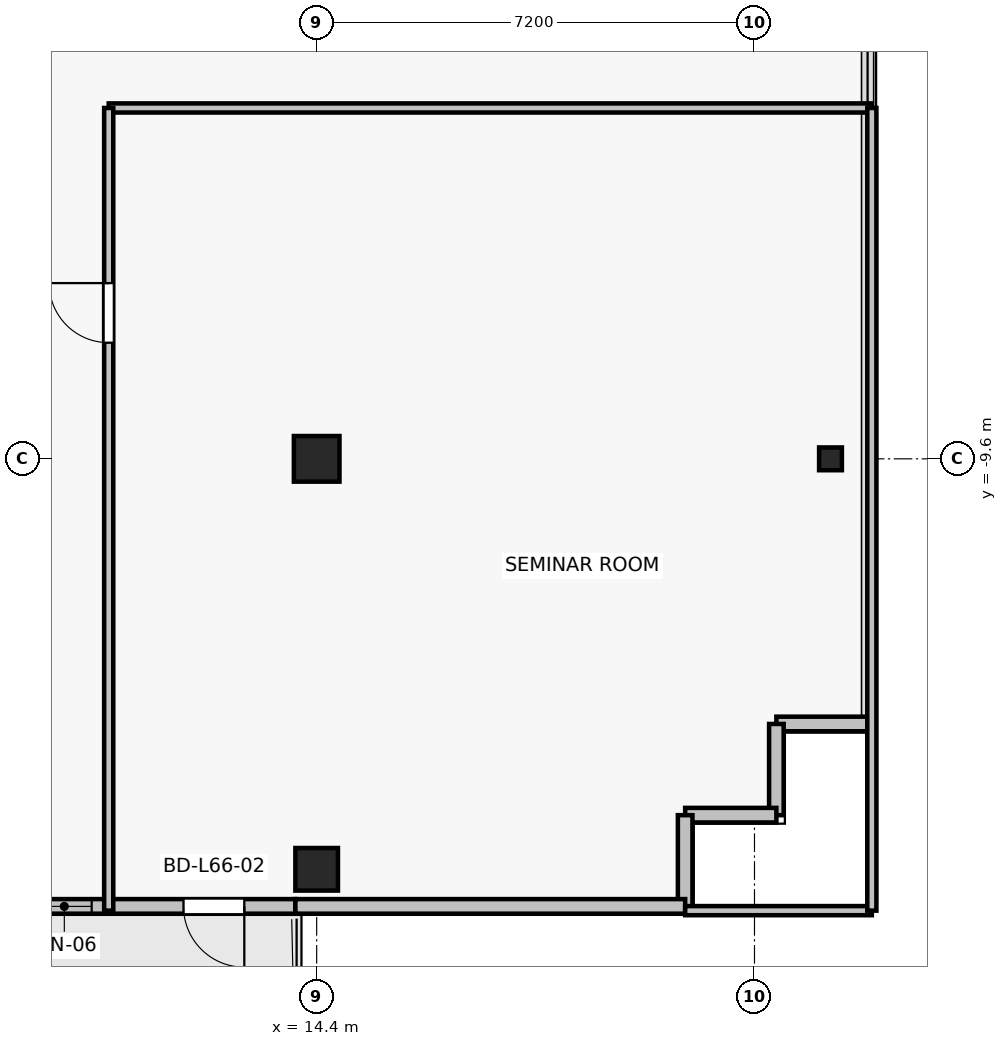
"""IFC4 building model, lengths in metres.
Left out: names, types, materials, properties, quantities, classifications, styles, units other than length and angle.
Written with IfcOpenShell. Run it as: python <this file> out.ifc"""

import sys

from ifc_helpers import new_model, si_unit, direction, frame, frame_2d, origin, origin_2d, place, context, subcontext, project, spatial, rectangle, i_section, extrude, source, transform, mapped, element, fill, save


model = new_model("IFC4")
c1 = context("Model", 3, precision=1e-05, world=origin(), true_north=direction((0.0, 1.0)))
c2 = subcontext(c1, "Body", "Model", "MODEL_VIEW")
j1 = project(units=[si_unit("LENGTHUNIT", "METRE"), si_unit("PLANEANGLEUNIT", "RADIAN")], contexts=[c1])
p1 = place(None, origin())
s1 = spatial("IfcSite", under=j1, at=p1, CompositionType="ELEMENT")
p2 = place(p1, origin())
s2 = spatial("IfcBuilding", under=s1, at=p2, CompositionType="ELEMENT")
p3 = place(p2, frame((0.0, 0.0, 235.3)))
s3 = spatial("IfcBuildingStorey", under=s2, at=p3, CompositionType="ELEMENT", Elevation=235.3)
p4 = place(p3, frame((14.4, -9.6, 0.0), z_axis=(0.0, 0.0, 1.0), x_axis=(1.0, 0.0, 0.0)))
e1 = element("IfcColumn", 1, at=p4, inside=s3, PredefinedType="COLUMN", context=c2, shape_type="SweptSolid", body=[
    extrude(rectangle(XDim=0.75, YDim=0.75, at=origin_2d()), origin(), (0.0, 0.0, 1.0), 3.3),
])
p5 = place(p3, frame((14.4, -16.35, 0.0), z_axis=(0.0, 0.0, 1.0), x_axis=(1.0, 0.0, 0.0)))
e2 = element("IfcColumn", 2, at=p5, inside=s3, PredefinedType="COLUMN", context=c2, shape_type="SweptSolid", body=[
    extrude(rectangle(XDim=0.7, YDim=0.7, at=origin_2d()), origin(), (0.0, 0.0, 1.0), 3.3),
])
p6 = place(p3, frame((22.85, -9.6, 0.0), z_axis=(0.0, 0.0, 1.0), x_axis=(1.0, 0.0, 0.0)))
e3 = element("IfcColumn", 3, at=p6, inside=s3, PredefinedType="COLUMN", context=c2, shape_type="SweptSolid", body=[
    extrude(i_section(OverallWidth=0.375, OverallDepth=0.375, WebThickness=0.017, FlangeThickness=0.027, FilletRadius=0.015, at=origin_2d()), origin(), (0.0, 0.0, 1.0), 3.3),
])
p7 = place(p3, frame((14.05, -16.96, 0.0), z_axis=(0.0, 0.0, 1.0), x_axis=(-1.0, 0.0, 0.0)))
e4 = element("IfcWall", 4, at=p7, inside=s3, PredefinedType="SOLIDWALL", context=c2, shape_type="SweptSolid", body=[
    extrude(rectangle(XDim=7.0, YDim=0.24, at=frame_2d((3.5, 0.0))), origin(), (0.0, 0.0, 1.0), 2.665),
])
p8 = place(p7, frame((0.84, 0.0, 0.0)))
e5 = element("IfcOpeningElement", 5, at=p8, cuts=e4, PredefinedType="OPENING", context=c2, shape_type="SweptSolid", body=[
    extrude(rectangle(XDim=1.0, YDim=2.2, at=frame_2d((0.5, 1.1))), frame((0.0, 0.13, 0.0), z_axis=(0.0, -1.0, 0.0), x_axis=(1.0, 0.0, 0.0)), (0.0, 0.0, 1.0), 0.26),
])
p9 = place(p7, frame((3.35, 0.0, 0.85)))
e6 = element("IfcOpeningElement", 6, at=p9, cuts=e4, PredefinedType="OPENING", context=c2, shape_type="SweptSolid", body=[
    extrude(rectangle(XDim=0.9, YDim=1.35, at=frame_2d((0.45, 0.675))), frame((0.0, 0.13, 0.0), z_axis=(0.0, -1.0, 0.0), x_axis=(1.0, 0.0, 0.0)), (0.0, 0.0, 1.0), 0.26),
])
for number, where, z_axis, x_axis in (
    (7, (21.96, -13.96, 0.0), (0.0, 0.0, 1.0), (1.0, 0.0, 0.0)),
    (8, (21.96, -15.46, 0.0), (0.0, 0.0, 1.0), (0.0, 1.0, 0.0)),
    (9, (20.46, -15.46, 0.0), (0.0, 0.0, 1.0), (1.0, 0.0, 0.0)),
    (10, (20.46, -16.96, 0.0), (0.0, 0.0, 1.0), (0.0, 1.0, 0.0)),
):
    element("IfcWall", number, at=place(p3, frame(where, z_axis=z_axis, x_axis=x_axis)), inside=s3, PredefinedType="SOLIDWALL", context=c2, shape_type="SweptSolid", body=[
        extrude(rectangle(XDim=1.5, YDim=0.24, at=frame_2d((0.75, 0.0))), origin(), (0.0, 0.0, 1.0), 3.075),
    ])
p10 = place(p3, frame((14.05, -16.96, 0.0), z_axis=(0.0, 0.0, 1.0), x_axis=(1.0, 0.0, 0.0)))
e11 = element("IfcWall", 11, at=p10, inside=s3, PredefinedType="SOLIDWALL", context=c2, shape_type="SweptSolid", body=[
    extrude(rectangle(XDim=6.41, YDim=0.24, at=frame_2d((3.205, 0.0))), origin(), (0.0, 0.0, 1.0), 3.075),
])
p11 = place(p3, frame((23.53, -17.03, 0.0), z_axis=(0.0, 0.0, 1.0), x_axis=(-1.0, 0.0, 0.0)))
e12 = element("IfcWall", 12, at=p11, inside=s3, PredefinedType="PARTITIONING", context=c2, shape_type="SweptSolid", body=[
    extrude(rectangle(XDim=3.07, YDim=0.15, at=frame_2d((1.535, 0.0))), origin(), (0.0, 0.0, 1.0), 2.665),
])
p12 = place(p3, frame((10.98, -3.83, 0.0), z_axis=(0.0, 0.0, 1.0), x_axis=(1.0, 0.0, 0.0)))
e13 = element("IfcWall", 13, at=p12, inside=s3, PredefinedType="PARTITIONING", context=c2, shape_type="SweptSolid", body=[
    extrude(rectangle(XDim=12.55, YDim=0.15, at=frame_2d((6.275, 0.0))), origin(), (0.0, 0.0, 1.0), 2.615),
])
p13 = place(p3, frame((10.98, -17.03, 0.0), z_axis=(0.0, 0.0, 1.0), x_axis=(0.0, 1.0, 0.0)))
e14 = element("IfcWall", 14, at=p13, inside=s3, PredefinedType="PARTITIONING", context=c2, shape_type="SweptSolid", body=[
    extrude(rectangle(XDim=13.2, YDim=0.15, at=frame_2d((6.6, 0.0))), origin(), (0.0, 0.0, 1.0), 2.615),
])
p14 = place(p13, frame((9.34, 0.0, 0.0)))
e15 = element("IfcOpeningElement", 15, at=p14, cuts=e14, PredefinedType="OPENING", context=c2, shape_type="SweptSolid", body=[
    extrude(rectangle(XDim=0.98, YDim=2.15, at=frame_2d((0.49, 1.075))), frame((0.0, 0.085, 0.0), z_axis=(0.0, -1.0, 0.0), x_axis=(1.0, 0.0, 0.0)), (0.0, 0.0, 1.0), 0.17),
])
p15 = place(p3, frame((23.53, -3.83, 0.0), z_axis=(0.0, 0.0, 1.0), x_axis=(0.0, -1.0, 0.0)))
e16 = element("IfcWall", 16, at=p15, inside=s3, PredefinedType="PARTITIONING", context=c2, shape_type="SweptSolid", body=[
    extrude(rectangle(XDim=13.2, YDim=0.15, at=frame_2d((6.6, 0.0))), origin(), (0.0, 0.0, 1.0), 2.665),
])
m1 = source(origin(), c2, "Body", "SweptSolid", [
    extrude(rectangle(XDim=1.0, YDim=2.2, at=frame_2d((0.5, 1.1))), frame((0.0, 0.025, 0.0), z_axis=(0.0, -1.0, 0.0), x_axis=(1.0, 0.0, 0.0)), (0.0, 0.0, 1.0), 0.05),
])
p16 = place(p8, origin())
e17 = element("IfcDoor", 17, at=p16, inside=s3, OperationType="SINGLE_SWING_LEFT", PredefinedType="DOOR", context=c2, shape_type="MappedRepresentation", body=[
    mapped(m1, transform((0.0, 0.0, 0.0), x_axis=(1.0, 0.0, 0.0), y_axis=(0.0, 1.0, 0.0), z_axis=(0.0, 0.0, 1.0), scale=1.0)),
])
fill(e5, e17)
m2 = source(origin(), c2, "Body", "SweptSolid", [
    extrude(rectangle(XDim=0.9, YDim=1.35, at=frame_2d((0.45, 0.675))), frame((0.0, 0.03, 0.0), z_axis=(0.0, -1.0, 0.0), x_axis=(1.0, 0.0, 0.0)), (0.0, 0.0, 1.0), 0.06),
])
p17 = place(p9, origin())
e18 = element("IfcWindow", 18, at=p17, inside=s3, PartitioningType="SINGLE_PANEL", PredefinedType="WINDOW", context=c2, shape_type="MappedRepresentation", body=[
    mapped(m2, transform((0.0, 0.0, 0.0), x_axis=(1.0, 0.0, 0.0), y_axis=(0.0, 1.0, 0.0), z_axis=(0.0, 0.0, 1.0), scale=1.0)),
])
fill(e6, e18)
m3 = source(origin(), c2, "Body", "SweptSolid", [
    extrude(rectangle(XDim=0.98, YDim=2.15, at=frame_2d((0.49, 1.075))), frame((0.0, 0.025, 0.0), z_axis=(0.0, -1.0, 0.0), x_axis=(1.0, 0.0, 0.0)), (0.0, 0.0, 1.0), 0.05),
])
p18 = place(p14, origin())
e19 = element("IfcDoor", 19, at=p18, inside=s3, OperationType="SINGLE_SWING_RIGHT", PredefinedType="DOOR", context=c2, shape_type="MappedRepresentation", body=[
    mapped(m3, transform((0.0, 0.0, 0.0), x_axis=(1.0, 0.0, 0.0), y_axis=(0.0, 1.0, 0.0), z_axis=(0.0, 0.0, 1.0), scale=1.0)),
])
fill(e15, e19)
save(model, sys.argv[1])
